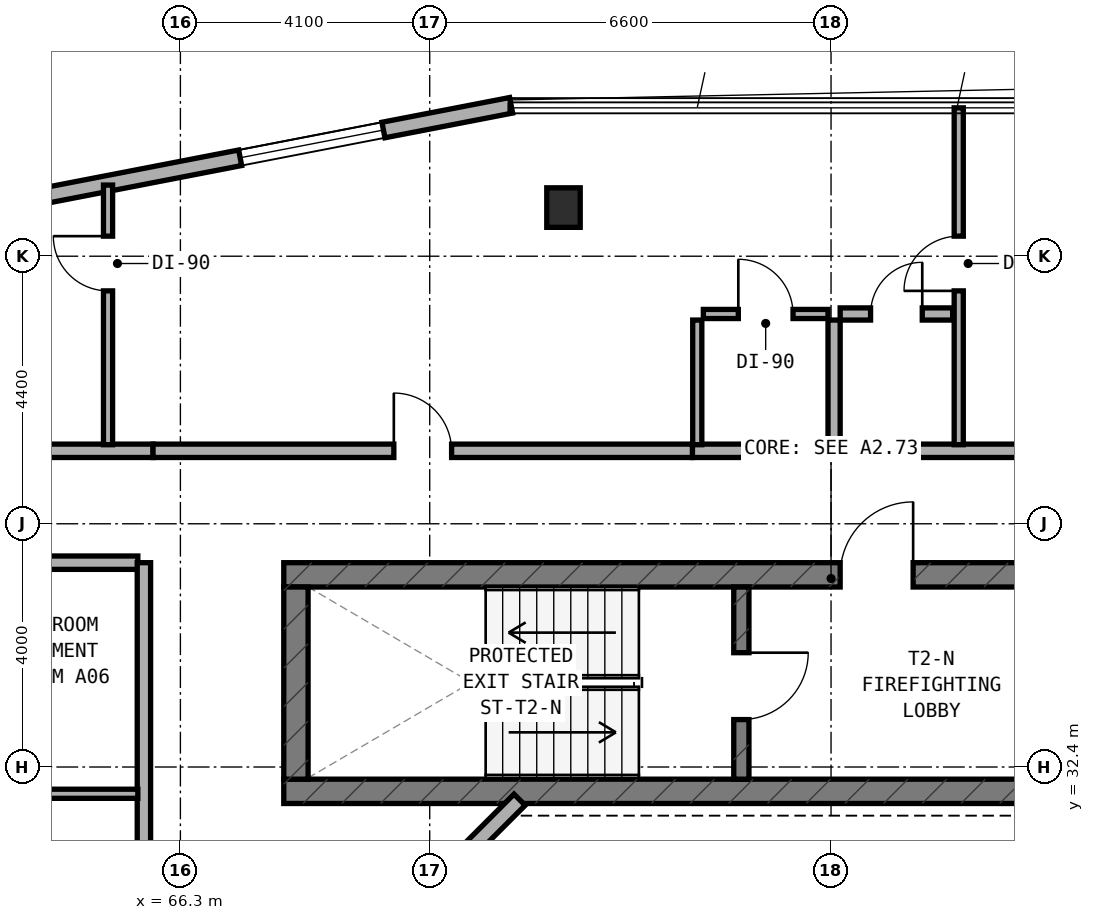
"""IFC4 building model, lengths in metres.
Left out: names, types, materials, properties, quantities, classifications, styles, units other than length and angle.
Written with IfcOpenShell. Run it as: python <this file> out.ifc"""

import sys

from ifc_helpers import new_model, si_unit, direction, frame, frame_2d, origin, origin_2d, place, context, subcontext, project, spatial, rectangle, extrude, element, fill, save


model = new_model("IFC4")
c1 = context("Model", 3, precision=1e-05, world=origin(), true_north=direction((0.0, 1.0)))
c2 = subcontext(c1, "Body", "Model", "MODEL_VIEW")
j1 = project(units=[si_unit("LENGTHUNIT", "METRE"), si_unit("PLANEANGLEUNIT", "RADIAN")], contexts=[c1])
p1 = place(None, origin())
s1 = spatial("IfcSite", under=j1, at=p1, CompositionType="ELEMENT")
p2 = place(p1, origin())
s2 = spatial("IfcBuilding", under=s1, at=p2, CompositionType="ELEMENT")
p3 = place(p2, frame((0.0, 0.0, 116.0)))
s3 = spatial("IfcBuildingStorey", under=s2, at=p3, CompositionType="ELEMENT", Elevation=116.0)
p4 = place(p3, frame((68.0, 32.0, 0.0), z_axis=(0.0, 0.0, 1.0), x_axis=(1.0, 0.0, 0.0)))
e1 = element("IfcWall", 1, at=p4, inside=s3, PredefinedType="SHEAR", context=c2, shape_type="SweptSolid", body=[
    extrude(rectangle(XDim=18.2, YDim=0.4, at=frame_2d((9.1, 0.0))), origin(), (0.0, 0.0, 1.0), 3.5),
])
p5 = place(p3, frame((68.0, 35.56, 0.0), z_axis=(0.0, 0.0, 1.0), x_axis=(1.0, 0.0, 0.0)))
e2 = element("IfcWall", 2, at=p5, inside=s3, PredefinedType="SHEAR", context=c2, shape_type="SweptSolid", body=[
    extrude(rectangle(XDim=18.2, YDim=0.4, at=frame_2d((9.1, 0.0))), origin(), (0.0, 0.0, 1.0), 3.5),
])
p6 = place(p5, frame((9.15, 0.0, 0.0)))
e3 = element("IfcOpeningElement", 3, at=p6, cuts=e2, PredefinedType="OPENING", context=c2, shape_type="SweptSolid", body=[
    extrude(rectangle(XDim=1.2, YDim=2.15, at=frame_2d((0.6, 1.075))), frame((0.0, 0.21, 0.0), z_axis=(0.0, -1.0, 0.0), x_axis=(1.0, 0.0, 0.0)), (0.0, 0.0, 1.0), 0.42),
])
p7 = place(p5, frame((16.75, 0.0, 0.0)))
e4 = element("IfcOpeningElement", 4, at=p7, cuts=e2, PredefinedType="OPENING", context=c2, shape_type="SweptSolid", body=[
    extrude(rectangle(XDim=0.85, YDim=2.1, at=frame_2d((0.425, 1.05))), frame((0.0, 0.21, 0.0), z_axis=(0.0, -1.0, 0.0), x_axis=(1.0, 0.0, 0.0)), (0.0, 0.0, 1.0), 0.42),
])
p8 = place(p3, frame((68.2, 32.2, 0.0), z_axis=(0.0, 0.0, 1.0), x_axis=(0.0, 1.0, 0.0)))
e5 = element("IfcWall", 5, at=p8, inside=s3, PredefinedType="SHEAR", context=c2, shape_type="SweptSolid", body=[
    extrude(rectangle(XDim=3.16, YDim=0.4, at=frame_2d((1.58, 0.0))), origin(), (0.0, 0.0, 1.0), 3.5),
])
p9 = place(p3, frame((75.525, 32.2, 0.0), z_axis=(0.0, 0.0, 1.0), x_axis=(0.0, 1.0, 0.0)))
e6 = element("IfcWall", 6, at=p9, inside=s3, PredefinedType="STANDARD", context=c2, shape_type="SweptSolid", body=[
    extrude(rectangle(XDim=3.16, YDim=0.25, at=frame_2d((1.58, 0.0))), origin(), (0.0, 0.0, 1.0), 3.18),
])
p10 = place(p9, frame((0.98, 0.0, 0.0)))
e7 = element("IfcOpeningElement", 7, at=p10, cuts=e6, PredefinedType="OPENING", context=c2, shape_type="SweptSolid", body=[
    extrude(rectangle(XDim=1.1, YDim=2.15, at=frame_2d((0.55, 1.075))), frame((0.0, 0.135, 0.0), z_axis=(0.0, -1.0, 0.0), x_axis=(1.0, 0.0, 0.0)), (0.0, 0.0, 1.0), 0.27),
])
p11 = place(p3, frame((72.6, 41.6, 0.0), z_axis=(0.0, 0.0, 1.0), x_axis=(1.0, 0.0, 0.0)))
e8 = element("IfcColumn", 8, at=p11, inside=s3, PredefinedType="COLUMN", context=c2, shape_type="SweptSolid", body=[
    extrude(rectangle(XDim=0.55, YDim=0.65, at=origin_2d()), origin(), (0.0, 0.0, 1.0), 3.5),
])
p12 = place(p3, frame((71.739, 43.282, 0.0), z_axis=(0.0, 0.0, 1.0), x_axis=(-0.981750199588, -0.190175039396, 0.0)))
e9 = element("IfcWall", 9, at=p12, inside=s3, PredefinedType="STANDARD", context=c2, shape_type="SweptSolid", body=[
    extrude(rectangle(XDim=8.477, YDim=0.26, at=frame_2d((4.238, 0.0))), origin(), (0.0, 0.0, 1.0), 3.18),
])
p13 = place(p12, frame((2.139, 0.0, 0.8)))
e10 = element("IfcOpeningElement", 10, at=p13, cuts=e9, PredefinedType="OPENING", context=c2, shape_type="SweptSolid", body=[
    extrude(rectangle(XDim=2.4, YDim=1.6, at=frame_2d((1.2, 0.8))), frame((0.0, 0.14, 0.0), z_axis=(0.0, -1.0, 0.0), x_axis=(1.0, 0.0, 0.0)), (0.0, 0.0, 1.0), 0.28),
])
p14 = place(p3, frame((71.878, 31.862, 0.0), z_axis=(0.0, 0.0, 1.0), x_axis=(-0.707106781187, -0.707106781187, 0.0)))
e11 = element("IfcWall", 11, at=p14, inside=s3, PredefinedType="STANDARD", context=c2, shape_type="SweptSolid", body=[
    extrude(rectangle(XDim=2.311, YDim=0.26, at=frame_2d((1.155, 0.0))), origin(), (0.0, 0.0, 1.0), 3.18),
])
p15 = place(p3, frame((59.36, 37.6, 0.0), z_axis=(0.0, 0.0, 1.0), x_axis=(1.0, 0.0, 0.0)))
e12 = element("IfcWall", 12, at=p15, inside=s3, PredefinedType="SOLIDWALL", context=c2, shape_type="SweptSolid", body=[
    extrude(rectangle(XDim=6.49, YDim=0.22, at=frame_2d((3.245, 0.0))), origin(), (0.0, 0.0, 1.0), 2.875),
])
p16 = place(p3, frame((74.72, 37.6, 0.0), z_axis=(0.0, 0.0, 1.0), x_axis=(1.0, 0.0, 0.0)))
e13 = element("IfcWall", 13, at=p16, inside=s3, PredefinedType="SOLIDWALL", context=c2, shape_type="SweptSolid", body=[
    extrude(rectangle(XDim=6.68, YDim=0.22, at=frame_2d((3.34, 0.0))), origin(), (0.0, 0.0, 1.0), 2.755),
])
p17 = place(p3, frame((65.85, 37.6, 0.0), z_axis=(0.0, 0.0, 1.0), x_axis=(1.0, 0.0, 0.0)))
e14 = element("IfcWall", 14, at=p17, inside=s3, PredefinedType="SOLIDWALL", context=c2, shape_type="SweptSolid", body=[
    extrude(rectangle(XDim=8.87, YDim=0.22, at=frame_2d((4.435, 0.0))), origin(), (0.0, 0.0, 1.0), 2.755),
])
p18 = place(p17, frame((3.96, 0.0, 0.0)))
e15 = element("IfcOpeningElement", 15, at=p18, cuts=e14, PredefinedType="OPENING", context=c2, shape_type="SweptSolid", body=[
    extrude(rectangle(XDim=0.95, YDim=2.1, at=frame_2d((0.475, 1.05))), frame((0.0, 0.12, 0.0), z_axis=(0.0, -1.0, 0.0), x_axis=(1.0, 0.0, 0.0)), (0.0, 0.0, 1.0), 0.24),
])
p19 = place(p3, frame((65.11, 37.7, 0.0), z_axis=(0.0, 0.0, 1.0), x_axis=(0.0, 1.0, 0.0)))
e16 = element("IfcWall", 16, at=p19, inside=s3, PredefinedType="PARTITIONING", context=c2, shape_type="SweptSolid", body=[
    extrude(rectangle(XDim=4.27, YDim=0.15, at=frame_2d((2.135, 0.0))), origin(), (0.0, 0.0, 1.0), 2.875),
])
p20 = place(p19, frame((2.53, 0.0, 0.0)))
e17 = element("IfcOpeningElement", 17, at=p20, cuts=e16, PredefinedType="OPENING", context=c2, shape_type="SweptSolid", body=[
    extrude(rectangle(XDim=0.9, YDim=2.1, at=frame_2d((0.45, 1.05))), frame((0.0, 0.085, 0.0), z_axis=(0.0, -1.0, 0.0), x_axis=(1.0, 0.0, 0.0)), (0.0, 0.0, 1.0), 0.17),
])
p21 = place(p3, frame((79.1, 37.7, 0.0), z_axis=(0.0, 0.0, 1.0), x_axis=(0.0, 1.0, 0.0)))
e18 = element("IfcWall", 18, at=p21, inside=s3, PredefinedType="PARTITIONING", context=c2, shape_type="SweptSolid", body=[
    extrude(rectangle(XDim=5.54, YDim=0.15, at=frame_2d((2.77, 0.0))), origin(), (0.0, 0.0, 1.0), 2.855),
])
p22 = place(p21, frame((2.53, 0.0, 0.0)))
e19 = element("IfcOpeningElement", 19, at=p22, cuts=e18, PredefinedType="OPENING", context=c2, shape_type="SweptSolid", body=[
    extrude(rectangle(XDim=0.9, YDim=2.1, at=frame_2d((0.45, 1.05))), frame((0.0, 0.085, 0.0), z_axis=(0.0, -1.0, 0.0), x_axis=(1.0, 0.0, 0.0)), (0.0, 0.0, 1.0), 0.17),
])
p23 = place(p3, frame((77.05, 37.7, 0.0), z_axis=(0.0, 0.0, 1.0), x_axis=(0.0, 1.0, 0.0)))
e20 = element("IfcWall", 20, at=p23, inside=s3, PredefinedType="PLUMBINGWALL", context=c2, shape_type="SweptSolid", body=[
    extrude(rectangle(XDim=2.05, YDim=0.2, at=frame_2d((1.025, 0.0))), origin(), (0.0, 0.0, 1.0), 2.855),
])
p24 = place(p3, frame((74.8, 37.7, 0.0), z_axis=(0.0, 0.0, 1.0), x_axis=(0.0, 1.0, 0.0)))
e21 = element("IfcWall", 21, at=p24, inside=s3, PredefinedType="PARTITIONING", context=c2, shape_type="SweptSolid", body=[
    extrude(rectangle(XDim=2.05, YDim=0.15, at=frame_2d((1.025, 0.0))), origin(), (0.0, 0.0, 1.0), 2.855),
])
p25 = place(p3, frame((77.15, 39.85, 0.0), z_axis=(0.0, 0.0, 1.0), x_axis=(1.0, 0.0, 0.0)))
e22 = element("IfcWall", 22, at=p25, inside=s3, PredefinedType="PLUMBINGWALL", context=c2, shape_type="SweptSolid", body=[
    extrude(rectangle(XDim=1.85, YDim=0.2, at=frame_2d((0.925, 0.0))), origin(), (0.0, 0.0, 1.0), 3.18),
])
p26 = place(p25, frame((0.5, 0.0, 0.0)))
e23 = element("IfcOpeningElement", 23, at=p26, cuts=e22, PredefinedType="OPENING", context=c2, shape_type="SweptSolid", body=[
    extrude(rectangle(XDim=0.85, YDim=2.1, at=frame_2d((0.425, 1.05))), frame((0.0, 0.11, 0.0), z_axis=(0.0, -1.0, 0.0), x_axis=(1.0, 0.0, 0.0)), (0.0, 0.0, 1.0), 0.22),
])
p27 = place(p3, frame((74.9, 39.85, 0.0), z_axis=(0.0, 0.0, 1.0), x_axis=(1.0, 0.0, 0.0)))
e24 = element("IfcWall", 24, at=p27, inside=s3, PredefinedType="PARTITIONING", context=c2, shape_type="SweptSolid", body=[
    extrude(rectangle(XDim=2.05, YDim=0.15, at=frame_2d((1.025, 0.0))), origin(), (0.0, 0.0, 1.0), 3.18),
])
p28 = place(p27, frame((0.575, 0.0, 0.0)))
e25 = element("IfcOpeningElement", 25, at=p28, cuts=e24, PredefinedType="OPENING", context=c2, shape_type="SweptSolid", body=[
    extrude(rectangle(XDim=0.9, YDim=2.1, at=frame_2d((0.45, 1.05))), frame((0.0, 0.085, 0.0), z_axis=(0.0, -1.0, 0.0), x_axis=(1.0, 0.0, 0.0)), (0.0, 0.0, 1.0), 0.17),
])
p29 = place(p3, frame((59.52, 35.76, 0.0), z_axis=(0.0, 0.0, 1.0), x_axis=(1.0, 0.0, 0.0)))
e26 = element("IfcWall", 26, at=p29, inside=s3, PredefinedType="SOLIDWALL", context=c2, shape_type="SweptSolid", body=[
    extrude(rectangle(XDim=6.08, YDim=0.22, at=frame_2d((3.04, 0.0))), origin(), (0.0, 0.0, 1.0), 2.875),
])
p30 = place(p3, frame((65.7, 26.4, 0.0), z_axis=(0.0, 0.0, 1.0), x_axis=(0.0, 1.0, 0.0)))
e27 = element("IfcWall", 27, at=p30, inside=s3, PredefinedType="SOLIDWALL", context=c2, shape_type="SweptSolid", body=[
    extrude(rectangle(XDim=9.36, YDim=0.22, at=frame_2d((4.68, 0.0))), origin(), (0.0, 0.0, 1.0), 2.755),
])
p31 = place(p30, frame((2.305, 0.0, 0.0)))
e28 = element("IfcOpeningElement", 28, at=p31, cuts=e27, PredefinedType="OPENING", context=c2, shape_type="SweptSolid", body=[
    extrude(rectangle(XDim=0.95, YDim=2.1, at=frame_2d((0.475, 1.05))), frame((0.0, 0.12, 0.0), z_axis=(0.0, -1.0, 0.0), x_axis=(1.0, 0.0, 0.0)), (0.0, 0.0, 1.0), 0.24),
])
p32 = place(p3, frame((59.46, 31.96, 0.0), z_axis=(0.0, 0.0, 1.0), x_axis=(1.0, 0.0, 0.0)))
e29 = element("IfcWall", 29, at=p32, inside=s3, PredefinedType="PARTITIONING", context=c2, shape_type="SweptSolid", body=[
    extrude(rectangle(XDim=6.14, YDim=0.15, at=frame_2d((3.07, 0.0))), origin(), (0.0, 0.0, 1.0), 2.875),
])
p33 = place(p32, frame((2.79, 0.0, 0.0)))
e30 = element("IfcOpeningElement", 30, at=p33, cuts=e29, PredefinedType="OPENING", context=c2, shape_type="SweptSolid", body=[
    extrude(rectangle(XDim=0.9, YDim=2.1, at=frame_2d((0.45, 1.05))), frame((0.0, 0.085, 0.0), z_axis=(0.0, -1.0, 0.0), x_axis=(1.0, 0.0, 0.0)), (0.0, 0.0, 1.0), 0.17),
])
p34 = place(p13, origin())
e31 = element("IfcWindow", 31, at=p34, inside=s3, PartitioningType="SINGLE_PANEL", PredefinedType="WINDOW", context=c2, shape_type="SweptSolid", body=[
    extrude(rectangle(XDim=2.4, YDim=1.6, at=frame_2d((1.2, 0.8))), frame((0.0, 0.03, 0.0), z_axis=(0.0, -1.0, 0.0), x_axis=(1.0, 0.0, 0.0)), (0.0, 0.0, 1.0), 0.06),
])
fill(e10, e31)
p35 = place(p10, frame((1.1, 0.0, 0.0), z_axis=(0.0, 0.0, 1.0), x_axis=(-1.0, 0.0, 0.0)))
e32 = element("IfcDoor", 32, at=p35, inside=s3, OperationType="SINGLE_SWING_LEFT", PredefinedType="DOOR", context=c2, shape_type="SweptSolid", body=[
    extrude(rectangle(XDim=1.1, YDim=2.15, at=frame_2d((0.55, 1.075))), frame((0.0, 0.025, 0.0), z_axis=(0.0, -1.0, 0.0), x_axis=(1.0, 0.0, 0.0)), (0.0, 0.0, 1.0), 0.05),
])
fill(e7, e32)
p36 = place(p6, origin())
e33 = element("IfcDoor", 33, at=p36, inside=s3, OperationType="SINGLE_SWING_RIGHT", PredefinedType="DOOR", context=c2, shape_type="SweptSolid", body=[
    extrude(rectangle(XDim=1.2, YDim=2.15, at=frame_2d((0.6, 1.075))), frame((0.0, 0.025, 0.0), z_axis=(0.0, -1.0, 0.0), x_axis=(1.0, 0.0, 0.0)), (0.0, 0.0, 1.0), 0.05),
])
fill(e3, e33)
p37 = place(p18, origin())
e34 = element("IfcDoor", 34, at=p37, inside=s3, OperationType="SINGLE_SWING_LEFT", PredefinedType="DOOR", context=c2, shape_type="SweptSolid", body=[
    extrude(rectangle(XDim=0.95, YDim=2.1, at=frame_2d((0.475, 1.05))), frame((0.0, 0.025, 0.0), z_axis=(0.0, -1.0, 0.0), x_axis=(1.0, 0.0, 0.0)), (0.0, 0.0, 1.0), 0.05),
])
fill(e15, e34)
p38 = place(p20, origin())
e35 = element("IfcDoor", 35, at=p38, inside=s3, OperationType="SINGLE_SWING_RIGHT", PredefinedType="DOOR", context=c2, shape_type="SweptSolid", body=[
    extrude(rectangle(XDim=0.9, YDim=2.1, at=frame_2d((0.45, 1.05))), frame((0.0, 0.025, 0.0), z_axis=(0.0, -1.0, 0.0), x_axis=(1.0, 0.0, 0.0)), (0.0, 0.0, 1.0), 0.05),
])
fill(e17, e35)
p39 = place(p22, origin())
e36 = element("IfcDoor", 36, at=p39, inside=s3, OperationType="SINGLE_SWING_LEFT", PredefinedType="DOOR", context=c2, shape_type="SweptSolid", body=[
    extrude(rectangle(XDim=0.9, YDim=2.1, at=frame_2d((0.45, 1.05))), frame((0.0, 0.025, 0.0), z_axis=(0.0, -1.0, 0.0), x_axis=(1.0, 0.0, 0.0)), (0.0, 0.0, 1.0), 0.05),
])
fill(e19, e36)
p40 = place(p26, origin())
e37 = element("IfcDoor", 37, at=p40, inside=s3, OperationType="SINGLE_SWING_RIGHT", PredefinedType="DOOR", context=c2, shape_type="SweptSolid", body=[
    extrude(rectangle(XDim=0.85, YDim=2.1, at=frame_2d((0.425, 1.05))), frame((0.0, 0.025, 0.0), z_axis=(0.0, -1.0, 0.0), x_axis=(1.0, 0.0, 0.0)), (0.0, 0.0, 1.0), 0.05),
])
fill(e23, e37)
p41 = place(p28, origin())
e38 = element("IfcDoor", 38, at=p41, inside=s3, OperationType="SINGLE_SWING_LEFT", PredefinedType="DOOR", context=c2, shape_type="SweptSolid", body=[
    extrude(rectangle(XDim=0.9, YDim=2.1, at=frame_2d((0.45, 1.05))), frame((0.0, 0.025, 0.0), z_axis=(0.0, -1.0, 0.0), x_axis=(1.0, 0.0, 0.0)), (0.0, 0.0, 1.0), 0.05),
])
fill(e25, e38)
save(model, sys.argv[1])
